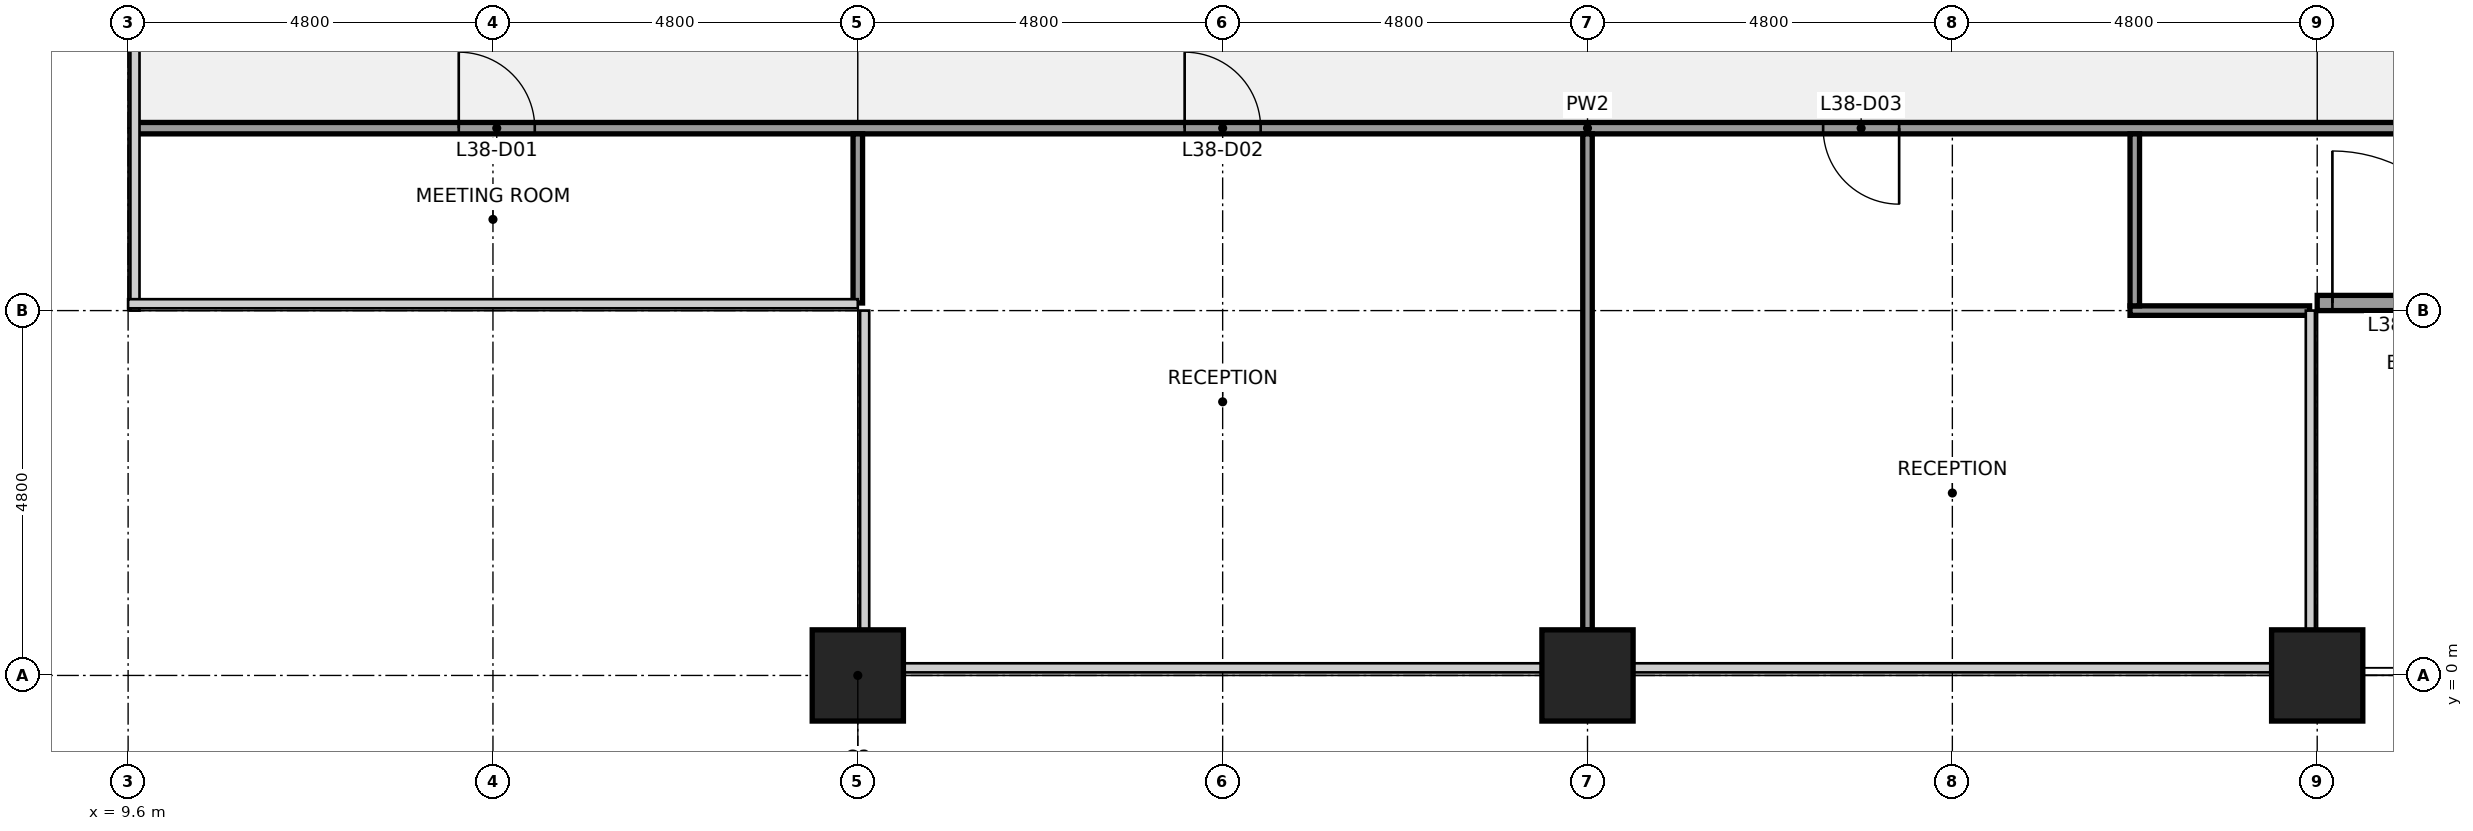
"""IFC4 building model, lengths in metres.
Left out: names, types, materials, properties, quantities, classifications, styles, units other than length and angle.
Written with IfcOpenShell. Run it as: python <this file> out.ifc"""

import sys

from ifc_helpers import new_model, si_unit, direction, frame, frame_2d, origin, origin_2d, place, context, subcontext, project, spatial, rectangle, extrude, element, fill, save


model = new_model("IFC4")
c1 = context("Model", 3, precision=1e-05, world=origin(), true_north=direction((0.0, 1.0)))
c2 = subcontext(c1, "Body", "Model", "MODEL_VIEW")
j1 = project(units=[si_unit("LENGTHUNIT", "METRE"), si_unit("PLANEANGLEUNIT", "RADIAN")], contexts=[c1])
p1 = place(None, origin())
s1 = spatial("IfcSite", under=j1, at=p1, CompositionType="ELEMENT")
p2 = place(p1, origin())
s2 = spatial("IfcBuilding", under=s1, at=p2, CompositionType="ELEMENT")
p3 = place(p2, frame((0.0, 0.0, 172.1)))
s3 = spatial("IfcBuildingStorey", under=s2, at=p3, CompositionType="ELEMENT", Elevation=172.1)
for number, where, z_axis, x_axis in (
    (1, (19.2, 0.0, 0.0), (0.0, 0.0, 1.0), (1.0, 0.0, 0.0)),
    (2, (28.8, 0.0, 0.0), (0.0, 0.0, 1.0), (1.0, 0.0, 0.0)),
    (3, (38.4, 0.0, 0.0), (0.0, 0.0, 1.0), (1.0, 0.0, 0.0)),
):
    element("IfcColumn", number, at=place(p3, frame(where, z_axis=z_axis, x_axis=x_axis)), inside=s3, PredefinedType="COLUMN", context=c2, shape_type="SweptSolid", body=[
        extrude(rectangle(XDim=1.2, YDim=1.2, at=origin_2d()), origin(), (0.0, 0.0, 1.0), 4.0),
    ])
p4 = place(p3, frame((35.938, 4.8, 0.0), z_axis=(0.0, 0.0, 1.0), x_axis=(1.0, 0.0, 0.0)))
e4 = element("IfcWall", 4, at=p4, inside=s3, PredefinedType="PARTITIONING", context=c2, shape_type="SweptSolid", body=[
    extrude(rectangle(XDim=2.363, YDim=0.125, at=frame_2d((1.181, 0.0))), origin(), (0.0, 0.0, 1.0), 2.709),
])
p5 = place(p3, frame((9.7, 7.2, 0.0), z_axis=(0.0, 0.0, 1.0), x_axis=(1.0, 0.0, 0.0)))
e5 = element("IfcWall", 5, at=p5, inside=s3, PredefinedType="PARTITIONING", context=c2, shape_type="SweptSolid", body=[
    extrude(rectangle(XDim=38.2, YDim=0.15, at=frame_2d((19.1, 0.0))), origin(), (0.0, 0.0, 1.0), 2.709),
])
p6 = place(p5, frame((4.25, 0.0, 0.0)))
e6 = element("IfcOpeningElement", 6, at=p6, cuts=e5, PredefinedType="OPENING", context=c2, shape_type="SweptSolid", body=[
    extrude(rectangle(XDim=1.0, YDim=2.1, at=frame_2d((0.5, 1.05))), frame((0.0, 0.085, 0.0), z_axis=(0.0, -1.0, 0.0), x_axis=(1.0, 0.0, 0.0)), (0.0, 0.0, 1.0), 0.17),
])
p7 = place(p5, frame((13.8, 0.0, 0.0)))
e7 = element("IfcOpeningElement", 7, at=p7, cuts=e5, PredefinedType="OPENING", context=c2, shape_type="SweptSolid", body=[
    extrude(rectangle(XDim=1.0, YDim=2.1, at=frame_2d((0.5, 1.05))), frame((0.0, 0.085, 0.0), z_axis=(0.0, -1.0, 0.0), x_axis=(1.0, 0.0, 0.0)), (0.0, 0.0, 1.0), 0.17),
])
p8 = place(p5, frame((22.2, 0.0, 0.0)))
e8 = element("IfcOpeningElement", 8, at=p8, cuts=e5, PredefinedType="OPENING", context=c2, shape_type="SweptSolid", body=[
    extrude(rectangle(XDim=1.0, YDim=2.1, at=frame_2d((0.5, 1.05))), frame((0.0, 0.085, 0.0), z_axis=(0.0, -1.0, 0.0), x_axis=(1.0, 0.0, 0.0)), (0.0, 0.0, 1.0), 0.17),
])
p9 = place(p5, frame((30.6, 0.0, 0.0)))
e9 = element("IfcOpeningElement", 9, at=p9, cuts=e5, PredefinedType="OPENING", context=c2, shape_type="SweptSolid", body=[
    extrude(rectangle(XDim=1.0, YDim=2.1, at=frame_2d((0.5, 1.05))), frame((0.0, 0.085, 0.0), z_axis=(0.0, -1.0, 0.0), x_axis=(1.0, 0.0, 0.0)), (0.0, 0.0, 1.0), 0.17),
])
p10 = place(p5, frame((35.35, 0.0, 0.0)))
e10 = element("IfcOpeningElement", 10, at=p10, cuts=e5, PredefinedType="OPENING", context=c2, shape_type="SweptSolid", body=[
    extrude(rectangle(XDim=1.0, YDim=2.1, at=frame_2d((0.5, 1.05))), frame((0.0, 0.085, 0.0), z_axis=(0.0, -1.0, 0.0), x_axis=(1.0, 0.0, 0.0)), (0.0, 0.0, 1.0), 0.17),
])
p11 = place(p3, frame((19.2, 4.9, 0.0), z_axis=(0.0, 0.0, 1.0), x_axis=(0.0, 1.0, 0.0)))
e11 = element("IfcWall", 11, at=p11, inside=s3, PredefinedType="PARTITIONING", context=c2, shape_type="SweptSolid", body=[
    extrude(rectangle(XDim=2.225, YDim=0.125, at=frame_2d((1.113, 0.0))), origin(), (0.0, 0.0, 1.0), 2.709),
])
p12 = place(p3, frame((28.8, 0.6, 0.0), z_axis=(0.0, 0.0, 1.0), x_axis=(0.0, 1.0, 0.0)))
e12 = element("IfcWall", 12, at=p12, inside=s3, PredefinedType="PARTITIONING", context=c2, shape_type="SweptSolid", body=[
    extrude(rectangle(XDim=6.525, YDim=0.125, at=frame_2d((3.262, 0.0))), origin(), (0.0, 0.0, 1.0), 2.709),
])
p13 = place(p3, frame((36.0, 4.863, 0.0), z_axis=(0.0, 0.0, 1.0), x_axis=(0.0, 1.0, 0.0)))
e13 = element("IfcWall", 13, at=p13, inside=s3, PredefinedType="PARTITIONING", context=c2, shape_type="SweptSolid", body=[
    extrude(rectangle(XDim=2.262, YDim=0.125, at=frame_2d((1.131, 0.0))), origin(), (0.0, 0.0, 1.0), 2.709),
])
p14 = place(p3, frame((38.4, 4.9, 0.0), z_axis=(0.0, 0.0, 1.0), x_axis=(1.0, 0.0, 0.0)))
e14 = element("IfcWall", 14, at=p14, inside=s3, PredefinedType="SOLIDWALL", context=c2, shape_type="SweptSolid", body=[
    extrude(rectangle(XDim=2.4, YDim=0.2, at=frame_2d((1.2, 0.0))), origin(), (0.0, 0.0, 1.0), 2.709),
])
p15 = place(p14, frame((0.2, 0.0, 0.0)))
e15 = element("IfcOpeningElement", 15, at=p15, cuts=e14, PredefinedType="OPENING", context=c2, shape_type="SweptSolid", body=[
    extrude(rectangle(XDim=2.0, YDim=2.1, at=frame_2d((1.0, 1.05))), frame((0.0, 0.11, 0.0), z_axis=(0.0, -1.0, 0.0), x_axis=(1.0, 0.0, 0.0)), (0.0, 0.0, 1.0), 0.22),
])
for number, where, z_axis, x_axis in (
    (16, (19.2, -1.05, 0.0), (0.0, 0.0, 1.0), (1.0, 0.0, 0.0)),
    (17, (38.4, -1.05, 0.0), (0.0, 0.0, 1.0), (1.0, 0.0, 0.0)),
):
    element("IfcColumn", number, at=place(p3, frame(where, z_axis=z_axis, x_axis=x_axis)), inside=s3, PredefinedType="PILASTER", context=c2, shape_type="SweptSolid", body=[
        extrude(rectangle(XDim=3.6, YDim=0.9, at=origin_2d()), origin(), (0.0, 0.0, 1.0), 4.0),
    ])
p16 = place(p6, origin())
e18 = element("IfcDoor", 18, at=p16, inside=s3, OperationType="SINGLE_SWING_LEFT", PredefinedType="DOOR", context=c2, shape_type="SweptSolid", body=[
    extrude(rectangle(XDim=1.0, YDim=2.1, at=frame_2d((0.5, 1.05))), frame((0.0, 0.025, 0.0), z_axis=(0.0, -1.0, 0.0), x_axis=(1.0, 0.0, 0.0)), (0.0, 0.0, 1.0), 0.05),
])
fill(e6, e18)
p17 = place(p7, origin())
e19 = element("IfcDoor", 19, at=p17, inside=s3, OperationType="SINGLE_SWING_LEFT", PredefinedType="DOOR", context=c2, shape_type="SweptSolid", body=[
    extrude(rectangle(XDim=1.0, YDim=2.1, at=frame_2d((0.5, 1.05))), frame((0.0, 0.025, 0.0), z_axis=(0.0, -1.0, 0.0), x_axis=(1.0, 0.0, 0.0)), (0.0, 0.0, 1.0), 0.05),
])
fill(e7, e19)
p18 = place(p8, origin())
e20 = element("IfcDoor", 20, at=p18, inside=s3, OperationType="SINGLE_SWING_RIGHT", PredefinedType="DOOR", context=c2, shape_type="SweptSolid", body=[
    extrude(rectangle(XDim=1.0, YDim=2.1, at=frame_2d((0.5, 1.05))), frame((0.0, 0.025, 0.0), z_axis=(0.0, -1.0, 0.0), x_axis=(1.0, 0.0, 0.0)), (0.0, 0.0, 1.0), 0.05),
])
fill(e8, e20)
p19 = place(p15, origin())
e21 = element("IfcDoor", 21, at=p19, inside=s3, OperationType="SINGLE_SWING_LEFT", PredefinedType="DOOR", context=c2, shape_type="SweptSolid", body=[
    extrude(rectangle(XDim=2.0, YDim=2.1, at=frame_2d((1.0, 1.05))), frame((0.0, 0.025, 0.0), z_axis=(0.0, -1.0, 0.0), x_axis=(1.0, 0.0, 0.0)), (0.0, 0.0, 1.0), 0.05),
])
fill(e15, e21)
save(model, sys.argv[1])
